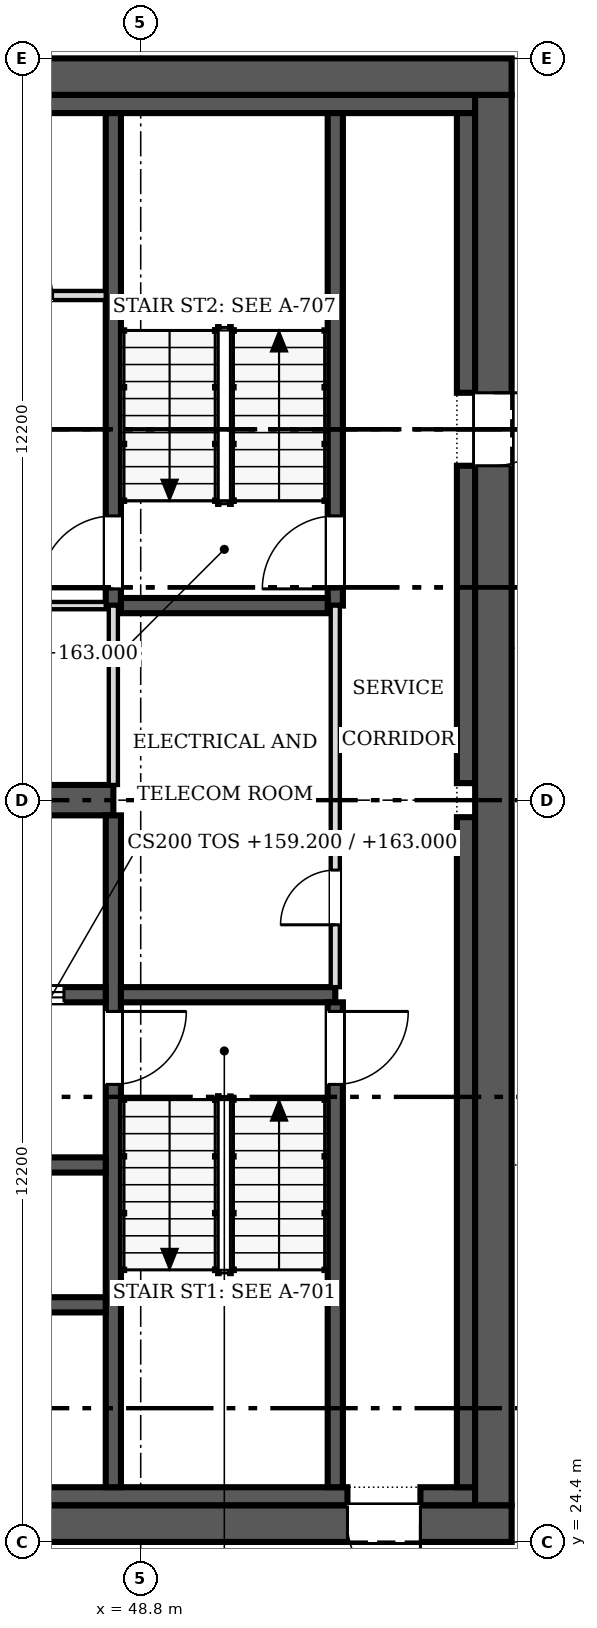
"""IFC4 building model, lengths in metres.
Left out: names, types, materials, properties, quantities, classifications, styles, units other than length and angle.
Written with IfcOpenShell. Run it as: python <this file> out.ifc"""

import sys

from ifc_helpers import new_model, si_unit, direction, frame, frame_2d, origin, place, context, subcontext, project, spatial, rectangle, extrude, source, transform, mapped, element, fill, save


model = new_model("IFC4")
c1 = context("Model", 3, precision=1e-05, world=origin(), true_north=direction((0.0, 1.0)))
c2 = subcontext(c1, "Body", "Model", "MODEL_VIEW")
j1 = project(units=[si_unit("LENGTHUNIT", "METRE"), si_unit("PLANEANGLEUNIT", "RADIAN")], contexts=[c1])
p1 = place(None, origin())
s1 = spatial("IfcSite", under=j1, at=p1, CompositionType="ELEMENT")
p2 = place(p1, origin())
s2 = spatial("IfcBuilding", under=s1, at=p2, CompositionType="ELEMENT")
p3 = place(p2, frame((0.0, 0.0, 159.2)))
s3 = spatial("IfcBuildingStorey", under=s2, at=p3, CompositionType="ELEMENT", Elevation=159.2)
p4 = place(p3, frame((54.9, 24.7, 0.0), z_axis=(0.0, 0.0, 1.0), x_axis=(-1.0, 0.0, 0.0)))
e1 = element("IfcWall", 1, at=p4, inside=s3, PredefinedType="SHEAR", context=c2, shape_type="SweptSolid", body=[
    extrude(rectangle(XDim=24.4, YDim=0.6, at=frame_2d((12.2, 0.0))), origin(), (0.0, 0.0, 1.0), 3.8),
])
m1 = source(origin(), c2, "Body", "SweptSolid", [
    extrude(rectangle(XDim=1.2, YDim=2.1, at=frame_2d((0.6, 1.05))), frame((0.0, 0.31, 0.0), z_axis=(0.0, -1.0, 0.0), x_axis=(1.0, 0.0, 0.0)), (0.0, 0.0, 1.0), 0.62),
])
p5 = place(p4, frame((1.5, 0.0, 0.0)))
e2 = element("IfcOpeningElement", 2, at=p5, cuts=e1, PredefinedType="OPENING", context=c2, shape_type="MappedRepresentation", body=[
    mapped(m1, transform((0.0, 0.0, 0.0), scale=1.0)),
])
p6 = place(p3, frame((30.5, 48.5, 0.0), z_axis=(0.0, 0.0, 1.0), x_axis=(1.0, 0.0, 0.0)))
e3 = element("IfcWall", 3, at=p6, inside=s3, PredefinedType="SHEAR", context=c2, shape_type="SweptSolid", body=[
    extrude(rectangle(XDim=24.4, YDim=0.6, at=frame_2d((12.2, 0.0))), origin(), (0.0, 0.0, 1.0), 3.8),
])
p7 = place(p3, frame((54.6, 48.2, 0.0), z_axis=(0.0, 0.0, 1.0), x_axis=(0.0, -1.0, 0.0)))
e4 = element("IfcWall", 4, at=p7, inside=s3, PredefinedType="SHEAR", context=c2, shape_type="SweptSolid", body=[
    extrude(rectangle(XDim=23.2, YDim=0.6, at=frame_2d((11.6, 0.0))), origin(), (0.0, 0.0, 1.0), 3.8),
])
p8 = place(p7, frame((4.9, 0.0, 0.0)))
e5 = element("IfcOpeningElement", 5, at=p8, cuts=e4, PredefinedType="OPENING", context=c2, shape_type="MappedRepresentation", body=[
    mapped(m1, transform((0.0, 0.0, 0.0), scale=1.0)),
])
p9 = place(p3, frame((31.1, 25.15, 0.0), z_axis=(0.0, 0.0, 1.0), x_axis=(1.0, 0.0, 0.0)))
e6 = element("IfcWall", 6, at=p9, inside=s3, PredefinedType="SOLIDWALL", context=c2, shape_type="SweptSolid", body=[
    extrude(rectangle(XDim=21.1, YDim=0.3, at=frame_2d((10.55, 0.0))), origin(), (0.0, 0.0, 1.0), 3.8),
])
p10 = place(p3, frame((53.4, 25.15, 0.0), z_axis=(0.0, 0.0, 1.0), x_axis=(1.0, 0.0, 0.0)))
e7 = element("IfcWall", 7, at=p10, inside=s3, PredefinedType="SOLIDWALL", context=c2, shape_type="SweptSolid", body=[
    extrude(rectangle(XDim=0.9, YDim=0.3, at=frame_2d((0.45, 0.0))), origin(), (0.0, 0.0, 1.0), 3.8),
])
p11 = place(p3, frame((31.1, 48.05, 0.0), z_axis=(0.0, 0.0, 1.0), x_axis=(1.0, 0.0, 0.0)))
e8 = element("IfcWall", 8, at=p11, inside=s3, PredefinedType="SOLIDWALL", context=c2, shape_type="SweptSolid", body=[
    extrude(rectangle(XDim=23.2, YDim=0.3, at=frame_2d((11.6, 0.0))), origin(), (0.0, 0.0, 1.0), 3.8),
])
p12 = place(p3, frame((54.15, 25.3, 0.0), z_axis=(0.0, 0.0, 1.0), x_axis=(0.0, 1.0, 0.0)))
e9 = element("IfcWall", 9, at=p12, inside=s3, PredefinedType="SOLIDWALL", context=c2, shape_type="SweptSolid", body=[
    extrude(rectangle(XDim=11.02, YDim=0.3, at=frame_2d((5.51, 0.0))), origin(), (0.0, 0.0, 1.0), 3.8),
])
p13 = place(p3, frame((54.15, 36.88, 0.0), z_axis=(0.0, 0.0, 1.0), x_axis=(0.0, 1.0, 0.0)))
e10 = element("IfcWall", 10, at=p13, inside=s3, PredefinedType="SOLIDWALL", context=c2, shape_type="SweptSolid", body=[
    extrude(rectangle(XDim=5.22, YDim=0.3, at=frame_2d((2.61, 0.0))), origin(), (0.0, 0.0, 1.0), 3.8),
])
p14 = place(p3, frame((54.15, 43.3, 0.0), z_axis=(0.0, 0.0, 1.0), x_axis=(0.0, 1.0, 0.0)))
e11 = element("IfcWall", 11, at=p14, inside=s3, PredefinedType="SOLIDWALL", context=c2, shape_type="SweptSolid", body=[
    extrude(rectangle(XDim=4.6, YDim=0.3, at=frame_2d((2.3, 0.0))), origin(), (0.0, 0.0, 1.0), 3.8),
])
p15 = place(p3, frame((31.4, 36.6, 0.0), z_axis=(0.0, 0.0, 1.0), x_axis=(1.0, 0.0, 0.0)))
e12 = element("IfcWall", 12, at=p15, inside=s3, PredefinedType="SHEAR", context=c2, shape_type="SweptSolid", body=[
    extrude(rectangle(XDim=16.95, YDim=0.5, at=frame_2d((8.475, 0.0))), origin(), (0.0, 0.0, 1.0), 3.8),
])
p16 = place(p3, frame((48.35, 36.35, 0.0), z_axis=(0.0, 0.0, 1.0), x_axis=(0.0, -1.0, 0.0)))
e13 = element("IfcWall", 13, at=p16, inside=s3, PredefinedType="SOLIDWALL", context=c2, shape_type="SweptSolid", body=[
    extrude(rectangle(XDim=11.05, YDim=0.25, at=frame_2d((5.525, 0.0))), origin(), (0.0, 0.0, 1.0), 3.8),
])
m2 = source(origin(), c2, "Body", "SweptSolid", [
    extrude(rectangle(XDim=1.2, YDim=2.1, at=frame_2d((0.6, 1.05))), frame((0.0, 0.135, 0.0), z_axis=(0.0, -1.0, 0.0), x_axis=(1.0, 0.0, 0.0)), (0.0, 0.0, 1.0), 0.27),
])
p17 = place(p16, frame((3.225, 0.0, 0.0)))
e14 = element("IfcOpeningElement", 14, at=p17, cuts=e13, PredefinedType="OPENING", context=c2, shape_type="MappedRepresentation", body=[
    mapped(m2, transform((0.0, 0.0, 0.0), scale=1.0)),
])
p18 = place(p3, frame((48.225, 33.4, 0.0), z_axis=(0.0, 0.0, 1.0), x_axis=(-1.0, 0.0, 0.0)))
e15 = element("IfcWall", 15, at=p18, inside=s3, PredefinedType="SOLIDWALL", context=c2, shape_type="SweptSolid", body=[
    extrude(rectangle(XDim=5.275, YDim=0.25, at=frame_2d((2.638, 0.0))), origin(), (0.0, 0.0, 1.0), 3.8),
])
p19 = place(p18, frame((3.512, 0.0, 0.0)))
e16 = element("IfcOpeningElement", 16, at=p19, cuts=e15, PredefinedType="OPENING", context=c2, shape_type="MappedRepresentation", body=[
    mapped(m2, transform((0.0, 0.0, 0.0), scale=1.0)),
])
p20 = place(p18, frame((0.688, 0.0, 0.0)))
e17 = element("IfcOpeningElement", 17, at=p20, cuts=e15, PredefinedType="OPENING", context=c2, shape_type="MappedRepresentation", body=[
    mapped(m2, transform((0.0, 0.0, 0.0), scale=1.0)),
])
p21 = place(p3, frame((48.475, 33.4, 0.0), z_axis=(0.0, 0.0, 1.0), x_axis=(1.0, 0.0, 0.0)))
e18 = element("IfcWall", 18, at=p21, inside=s3, PredefinedType="SOLIDWALL", context=c2, shape_type="SweptSolid", body=[
    extrude(rectangle(XDim=3.525, YDim=0.25, at=frame_2d((1.762, 0.0))), origin(), (0.0, 0.0, 1.0), 3.8),
])
p22 = place(p3, frame((48.35, 47.9, 0.0), z_axis=(0.0, 0.0, 1.0), x_axis=(0.0, -1.0, 0.0)))
e19 = element("IfcWall", 19, at=p22, inside=s3, PredefinedType="SOLIDWALL", context=c2, shape_type="SweptSolid", body=[
    extrude(rectangle(XDim=8.1, YDim=0.25, at=frame_2d((4.05, 0.0))), origin(), (0.0, 0.0, 1.0), 3.8),
])
p23 = place(p22, frame((6.625, 0.0, 0.0)))
e20 = element("IfcOpeningElement", 20, at=p23, cuts=e19, PredefinedType="OPENING", context=c2, shape_type="MappedRepresentation", body=[
    mapped(m2, transform((0.0, 0.0, 0.0), scale=1.0)),
])
p24 = place(p3, frame((52.0, 25.3, 0.0), z_axis=(0.0, 0.0, 1.0), x_axis=(0.0, 1.0, 0.0)))
e21 = element("IfcWall", 21, at=p24, inside=s3, PredefinedType="SOLIDWALL", context=c2, shape_type="SweptSolid", body=[
    extrude(rectangle(XDim=7.975, YDim=0.25, at=frame_2d((3.987, 0.0))), origin(), (0.0, 0.0, 1.0), 3.8),
])
p25 = place(p24, frame((6.625, 0.0, 0.0)))
e22 = element("IfcOpeningElement", 22, at=p25, cuts=e21, PredefinedType="OPENING", context=c2, shape_type="MappedRepresentation", body=[
    mapped(m2, transform((0.0, 0.0, 0.0), scale=1.0)),
])
p26 = place(p3, frame((52.0, 39.8, 0.0), z_axis=(0.0, 0.0, 1.0), x_axis=(0.0, 1.0, 0.0)))
e23 = element("IfcWall", 23, at=p26, inside=s3, PredefinedType="SOLIDWALL", context=c2, shape_type="SweptSolid", body=[
    extrude(rectangle(XDim=8.1, YDim=0.25, at=frame_2d((4.05, 0.0))), origin(), (0.0, 0.0, 1.0), 3.8),
])
p27 = place(p26, frame((0.275, 0.0, 0.0)))
e24 = element("IfcOpeningElement", 24, at=p27, cuts=e23, PredefinedType="OPENING", context=c2, shape_type="MappedRepresentation", body=[
    mapped(m2, transform((0.0, 0.0, 0.0), scale=1.0)),
])
for number, where, z_axis, x_axis in (
    (25, (42.95, 28.3, 0.0), (0.0, 0.0, 1.0), (1.0, 0.0, 0.0)),
    (26, (42.95, 30.6, 0.0), (0.0, 0.0, 1.0), (1.0, 0.0, 0.0)),
):
    element("IfcWall", number, at=place(p3, frame(where, z_axis=z_axis, x_axis=x_axis)), inside=s3, PredefinedType="SOLIDWALL", context=c2, shape_type="SweptSolid", body=[
        extrude(rectangle(XDim=5.275, YDim=0.25, at=frame_2d((2.638, 0.0))), origin(), (0.0, 0.0, 1.0), 3.8),
    ])
p28 = place(p3, frame((48.475, 39.8, 0.0), z_axis=(0.0, 0.0, 1.0), x_axis=(1.0, 0.0, 0.0)))
e27 = element("IfcWall", 27, at=p28, inside=s3, PredefinedType="SOLIDWALL", context=c2, shape_type="SweptSolid", body=[
    extrude(rectangle(XDim=3.4, YDim=0.25, at=frame_2d((1.7, 0.0))), origin(), (0.0, 0.0, 1.0), 3.8),
])
p29 = place(p3, frame((52.0, 33.525, 0.0), z_axis=(0.0, 0.0, 1.0), x_axis=(0.0, 1.0, 0.0)))
e28 = element("IfcWall", 28, at=p29, inside=s3, PredefinedType="PARTITIONING", context=c2, shape_type="SweptSolid", body=[
    extrude(rectangle(XDim=6.275, YDim=0.15, at=frame_2d((3.138, 0.0))), origin(), (0.0, 0.0, 1.0), 3.6),
])
m3 = source(origin(), c2, "Body", "SweptSolid", [
    extrude(rectangle(XDim=0.9, YDim=2.1, at=frame_2d((0.45, 1.05))), frame((0.0, 0.085, 0.0), z_axis=(0.0, -1.0, 0.0), x_axis=(1.0, 0.0, 0.0)), (0.0, 0.0, 1.0), 0.17),
])
p30 = place(p29, frame((1.025, 0.0, 0.0)))
e29 = element("IfcOpeningElement", 29, at=p30, cuts=e28, PredefinedType="OPENING", context=c2, shape_type="MappedRepresentation", body=[
    mapped(m3, transform((0.0, 0.0, 0.0), scale=1.0)),
])
p31 = place(p3, frame((48.225, 39.8, 0.0), z_axis=(0.0, 0.0, 1.0), x_axis=(-1.0, 0.0, 0.0)))
e30 = element("IfcWall", 30, at=p31, inside=s3, PredefinedType="PARTITIONING", context=c2, shape_type="SweptSolid", body=[
    extrude(rectangle(XDim=5.275, YDim=0.12, at=frame_2d((2.638, 0.0))), origin(), (0.0, 0.0, 1.0), 3.6),
])
m4 = source(origin(), c2, "Body", "SweptSolid", [
    extrude(rectangle(XDim=0.9, YDim=2.1, at=frame_2d((0.45, 1.05))), frame((0.0, 0.07, 0.0), z_axis=(0.0, -1.0, 0.0), x_axis=(1.0, 0.0, 0.0)), (0.0, 0.0, 1.0), 0.14),
])
p32 = place(p31, frame((2.25, 0.0, 0.0)))
e31 = element("IfcOpeningElement", 31, at=p32, cuts=e30, PredefinedType="OPENING", context=c2, shape_type="MappedRepresentation", body=[
    mapped(m4, transform((0.0, 0.0, 0.0), scale=1.0)),
])
p33 = place(p3, frame((48.35, 36.85, 0.0), z_axis=(0.0, 0.0, 1.0), x_axis=(0.0, 1.0, 0.0)))
e32 = element("IfcWall", 32, at=p33, inside=s3, PredefinedType="PARTITIONING", context=c2, shape_type="SweptSolid", body=[
    extrude(rectangle(XDim=2.95, YDim=0.15, at=frame_2d((1.475, 0.0))), origin(), (0.0, 0.0, 1.0), 3.6),
])
p34 = place(p3, frame((45.6, 44.9, 0.0), z_axis=(0.0, 0.0, 1.0), x_axis=(1.0, 0.0, 0.0)))
e33 = element("IfcWall", 33, at=p34, inside=s3, PredefinedType="PARTITIONING", context=c2, shape_type="SweptSolid", body=[
    extrude(rectangle(XDim=2.625, YDim=0.15, at=frame_2d((1.312, 0.0))), origin(), (0.0, 0.0, 1.0), 3.6),
])
p35 = place(p34, frame((0.85, 0.0, 0.0)))
e34 = element("IfcOpeningElement", 34, at=p35, cuts=e33, PredefinedType="OPENING", context=c2, shape_type="MappedRepresentation", body=[
    mapped(m3, transform((0.0, 0.0, 0.0), scale=1.0)),
])
m5 = source(origin(), c2, "Body", "SweptSolid", [
    extrude(rectangle(XDim=1.2, YDim=2.1, at=frame_2d((0.6, 1.05))), frame((0.0, 0.025, 0.0), z_axis=(0.0, -1.0, 0.0), x_axis=(1.0, 0.0, 0.0)), (0.0, 0.0, 1.0), 0.05),
])
p36 = place(p5, origin())
e35 = element("IfcDoor", 35, at=p36, inside=s3, OperationType="SINGLE_SWING_LEFT", PredefinedType="DOOR", context=c2, shape_type="MappedRepresentation", body=[
    mapped(m5, transform((0.0, 0.0, 0.0), scale=1.0)),
])
fill(e2, e35)
p37 = place(p8, origin())
e36 = element("IfcDoor", 36, at=p37, inside=s3, OperationType="SINGLE_SWING_LEFT", PredefinedType="DOOR", context=c2, shape_type="MappedRepresentation", body=[
    mapped(m5, transform((0.0, 0.0, 0.0), scale=1.0)),
])
fill(e5, e36)
p38 = place(p17, origin())
e37 = element("IfcDoor", 37, at=p38, inside=s3, OperationType="SINGLE_SWING_LEFT", PredefinedType="DOOR", context=c2, shape_type="MappedRepresentation", body=[
    mapped(m5, transform((0.0, 0.0, 0.0), scale=1.0)),
])
fill(e14, e37)
p39 = place(p20, origin())
e38 = element("IfcDoor", 38, at=p39, inside=s3, OperationType="DOUBLE_DOOR_SLIDING", PredefinedType="DOOR", context=c2, shape_type="MappedRepresentation", body=[
    mapped(m5, transform((0.0, 0.0, 0.0), scale=1.0)),
])
fill(e17, e38)
p40 = place(p23, origin())
e39 = element("IfcDoor", 39, at=p40, inside=s3, OperationType="SINGLE_SWING_RIGHT", PredefinedType="DOOR", context=c2, shape_type="MappedRepresentation", body=[
    mapped(m5, transform((0.0, 0.0, 0.0), scale=1.0)),
])
fill(e20, e39)
p41 = place(p25, origin())
e40 = element("IfcDoor", 40, at=p41, inside=s3, OperationType="SINGLE_SWING_RIGHT", PredefinedType="DOOR", context=c2, shape_type="MappedRepresentation", body=[
    mapped(m5, transform((0.0, 0.0, 0.0), scale=1.0)),
])
fill(e22, e40)
p42 = place(p27, origin())
e41 = element("IfcDoor", 41, at=p42, inside=s3, OperationType="SINGLE_SWING_LEFT", PredefinedType="DOOR", context=c2, shape_type="MappedRepresentation", body=[
    mapped(m5, transform((0.0, 0.0, 0.0), scale=1.0)),
])
fill(e24, e41)
m6 = source(origin(), c2, "Body", "SweptSolid", [
    extrude(rectangle(XDim=0.9, YDim=2.1, at=frame_2d((0.45, 1.05))), frame((0.0, 0.025, 0.0), z_axis=(0.0, -1.0, 0.0), x_axis=(1.0, 0.0, 0.0)), (0.0, 0.0, 1.0), 0.05),
])
p43 = place(p30, origin())
e42 = element("IfcDoor", 42, at=p43, inside=s3, OperationType="SINGLE_SWING_LEFT", PredefinedType="DOOR", context=c2, shape_type="MappedRepresentation", body=[
    mapped(m6, transform((0.0, 0.0, 0.0), scale=1.0)),
])
fill(e29, e42)
save(model, sys.argv[1])
